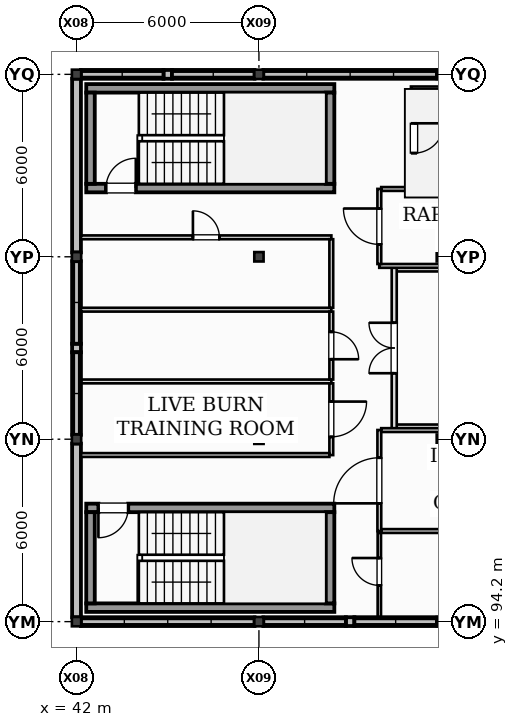
"""IFC4 building model, lengths in metres.
Left out: names, types, materials, properties, quantities, classifications, styles, units other than length and angle.
Written with IfcOpenShell. Run it as: python <this file> out.ifc"""

import sys

from ifc_helpers import new_model, si_unit, direction, frame, frame_2d, origin, origin_2d, place, context, subcontext, project, spatial, rectangle, i_section, extrude, element, fill, save


model = new_model("IFC4")
c1 = context("Model", 3, precision=1e-05, world=origin(), true_north=direction((0.0, 1.0)))
c2 = subcontext(c1, "Body", "Model", "MODEL_VIEW")
j1 = project(units=[si_unit("LENGTHUNIT", "METRE"), si_unit("PLANEANGLEUNIT", "RADIAN")], contexts=[c1])
p1 = place(None, origin())
s1 = spatial("IfcSite", under=j1, at=p1, CompositionType="ELEMENT")
p2 = place(p1, origin())
s2 = spatial("IfcBuilding", under=s1, at=p2, CompositionType="ELEMENT")
p3 = place(p2, frame((0.0, 0.0, 21.6)))
s3 = spatial("IfcBuildingStorey", under=s2, at=p3, CompositionType="ELEMENT", Elevation=21.6)
for number, where, z_axis, x_axis in (
    (1, (42.0, 94.2, 0.0), (0.0, 0.0, 1.0), (1.0, 0.0, 0.0)),
    (2, (42.0, 100.2, 0.0), (0.0, 0.0, 1.0), (1.0, 0.0, 0.0)),
    (3, (42.0, 106.2, 0.0), (0.0, 0.0, 1.0), (1.0, 0.0, 0.0)),
    (4, (42.0, 112.2, 0.0), (0.0, 0.0, 1.0), (1.0, 0.0, 0.0)),
    (5, (48.0, 94.2, 0.0), (0.0, 0.0, 1.0), (1.0, 0.0, 0.0)),
    (6, (48.0, 100.2, 0.0), (0.0, 0.0, 1.0), (1.0, 0.0, 0.0)),
    (7, (48.0, 106.2, 0.0), (0.0, 0.0, 1.0), (1.0, 0.0, 0.0)),
    (8, (48.0, 112.2, 0.0), (0.0, 0.0, 1.0), (1.0, 0.0, 0.0)),
    (9, (54.0, 94.2, 0.0), (0.0, 0.0, 1.0), (1.0, 0.0, 0.0)),
    (10, (54.0, 100.2, 0.0), (0.0, 0.0, 1.0), (1.0, 0.0, 0.0)),
    (11, (54.0, 106.2, 0.0), (0.0, 0.0, 1.0), (1.0, 0.0, 0.0)),
    (12, (54.0, 112.2, 0.0), (0.0, 0.0, 1.0), (1.0, 0.0, 0.0)),
):
    element("IfcColumn", number, at=place(p3, frame(where, z_axis=z_axis, x_axis=x_axis)), inside=s3, PredefinedType="COLUMN", context=c2, shape_type="SweptSolid", body=[
        extrude(i_section(OverallWidth=0.305, OverallDepth=0.308, WebThickness=0.01, FlangeThickness=0.015, at=origin_2d()), origin(), (0.0, 0.0, 1.0), 3.6),
    ])
p4 = place(p3, frame((42.145, 94.2, 0.0), z_axis=(0.0, 0.0, 1.0), x_axis=(1.0, 0.0, 0.0)))
e13 = element("IfcWall", 13, at=p4, inside=s3, PredefinedType="STANDARD", context=c2, shape_type="SweptSolid", body=[
    extrude(rectangle(XDim=5.71, YDim=0.29, at=frame_2d((2.855, 0.0))), origin(), (0.0, 0.0, 1.0), 0.32),
])
p5 = place(p3, frame((50.86, 94.2, 0.0), z_axis=(0.0, 0.0, 1.0), x_axis=(1.0, 0.0, 0.0)))
e14 = element("IfcWall", 14, at=p5, inside=s3, PredefinedType="STANDARD", context=c2, shape_type="SweptSolid", body=[
    extrude(rectangle(XDim=0.28, YDim=0.29, at=frame_2d((0.14, 0.0))), origin(), (0.0, 0.0, 1.0), 3.6),
])
p6 = place(p3, frame((48.145, 94.2, 0.0), z_axis=(0.0, 0.0, 1.0), x_axis=(1.0, 0.0, 0.0)))
e15 = element("IfcWall", 15, at=p6, inside=s3, PredefinedType="STANDARD", context=c2, shape_type="SweptSolid", body=[
    extrude(rectangle(XDim=2.715, YDim=0.29, at=frame_2d((1.357, 0.0))), origin(), (0.0, 0.0, 1.0), 0.44),
])
p7 = place(p3, frame((51.14, 94.2, 0.0), z_axis=(0.0, 0.0, 1.0), x_axis=(1.0, 0.0, 0.0)))
e16 = element("IfcWall", 16, at=p7, inside=s3, PredefinedType="STANDARD", context=c2, shape_type="SweptSolid", body=[
    extrude(rectangle(XDim=2.715, YDim=0.29, at=frame_2d((1.357, 0.0))), origin(), (0.0, 0.0, 1.0), 0.56),
])
p8 = place(p3, frame((45.14, 112.2, 0.0), z_axis=(0.0, 0.0, 1.0), x_axis=(-1.0, 0.0, 0.0)))
e17 = element("IfcWall", 17, at=p8, inside=s3, PredefinedType="STANDARD", context=c2, shape_type="SweptSolid", body=[
    extrude(rectangle(XDim=0.28, YDim=0.29, at=frame_2d((0.14, 0.0))), origin(), (0.0, 0.0, 1.0), 3.6),
])
p9 = place(p3, frame((47.855, 112.2, 0.0), z_axis=(0.0, 0.0, 1.0), x_axis=(-1.0, 0.0, 0.0)))
e18 = element("IfcWall", 18, at=p9, inside=s3, PredefinedType="STANDARD", context=c2, shape_type="SweptSolid", body=[
    extrude(rectangle(XDim=2.715, YDim=0.29, at=frame_2d((1.357, 0.0))), origin(), (0.0, 0.0, 1.0), 0.68),
])
p10 = place(p3, frame((44.86, 112.2, 0.0), z_axis=(0.0, 0.0, 1.0), x_axis=(-1.0, 0.0, 0.0)))
e19 = element("IfcWall", 19, at=p10, inside=s3, PredefinedType="STANDARD", context=c2, shape_type="SweptSolid", body=[
    extrude(rectangle(XDim=2.715, YDim=0.29, at=frame_2d((1.357, 0.0))), origin(), (0.0, 0.0, 1.0), 0.8),
])
p11 = place(p3, frame((53.855, 112.2, 0.0), z_axis=(0.0, 0.0, 1.0), x_axis=(-1.0, 0.0, 0.0)))
e20 = element("IfcWall", 20, at=p11, inside=s3, PredefinedType="STANDARD", context=c2, shape_type="SweptSolid", body=[
    extrude(rectangle(XDim=5.71, YDim=0.29, at=frame_2d((2.855, 0.0))), origin(), (0.0, 0.0, 1.0), 0.92),
])
p12 = place(p3, frame((42.0, 100.055, 0.0), z_axis=(0.0, 0.0, 1.0), x_axis=(0.0, -1.0, 0.0)))
e21 = element("IfcWall", 21, at=p12, inside=s3, PredefinedType="STANDARD", context=c2, shape_type="SweptSolid", body=[
    extrude(rectangle(XDim=5.71, YDim=0.29, at=frame_2d((2.855, 0.0))), origin(), (0.0, 0.0, 1.0), 2.813),
])
p13 = place(p3, frame((42.0, 103.34, 0.0), z_axis=(0.0, 0.0, 1.0), x_axis=(0.0, -1.0, 0.0)))
e22 = element("IfcWall", 22, at=p13, inside=s3, PredefinedType="STANDARD", context=c2, shape_type="SweptSolid", body=[
    extrude(rectangle(XDim=0.28, YDim=0.29, at=frame_2d((0.14, 0.0))), origin(), (0.0, 0.0, 1.0), 2.813),
])
p14 = place(p3, frame((42.0, 106.055, 0.0), z_axis=(0.0, 0.0, 1.0), x_axis=(0.0, -1.0, 0.0)))
e23 = element("IfcWall", 23, at=p14, inside=s3, PredefinedType="STANDARD", context=c2, shape_type="SweptSolid", body=[
    extrude(rectangle(XDim=2.715, YDim=0.29, at=frame_2d((1.357, 0.0))), origin(), (0.0, 0.0, 1.0), 0.32),
])
p15 = place(p3, frame((42.0, 103.06, 0.0), z_axis=(0.0, 0.0, 1.0), x_axis=(0.0, -1.0, 0.0)))
e24 = element("IfcWall", 24, at=p15, inside=s3, PredefinedType="STANDARD", context=c2, shape_type="SweptSolid", body=[
    extrude(rectangle(XDim=2.715, YDim=0.29, at=frame_2d((1.357, 0.0))), origin(), (0.0, 0.0, 1.0), 0.44),
])
p16 = place(p3, frame((42.0, 112.055, 0.0), z_axis=(0.0, 0.0, 1.0), x_axis=(0.0, -1.0, 0.0)))
e25 = element("IfcWall", 25, at=p16, inside=s3, PredefinedType="STANDARD", context=c2, shape_type="SweptSolid", body=[
    extrude(rectangle(XDim=5.71, YDim=0.29, at=frame_2d((2.855, 0.0))), origin(), (0.0, 0.0, 1.0), 3.6),
])
p17 = place(p3, frame((42.32, 94.66, 0.0), z_axis=(0.0, 0.0, 1.0), x_axis=(1.0, 0.0, 0.0)))
e26 = element("IfcWall", 26, at=p17, inside=s3, PredefinedType="SHEAR", context=c2, shape_type="SweptSolid", body=[
    extrude(rectangle(XDim=8.16, YDim=0.28, at=frame_2d((4.08, 0.0))), origin(), (0.0, 0.0, 1.0), 3.18),
])
p18 = place(p3, frame((50.48, 97.94, 0.0), z_axis=(0.0, 0.0, 1.0), x_axis=(-1.0, 0.0, 0.0)))
e27 = element("IfcWall", 27, at=p18, inside=s3, PredefinedType="SHEAR", context=c2, shape_type="SweptSolid", body=[
    extrude(rectangle(XDim=8.16, YDim=0.28, at=frame_2d((4.08, 0.0))), origin(), (0.0, 0.0, 1.0), 3.18),
])
p19 = place(p18, frame((6.78, 0.0, 0.0)))
e28 = element("IfcOpeningElement", 28, at=p19, cuts=e27, PredefinedType="OPENING", context=c2, shape_type="SweptSolid", body=[
    extrude(rectangle(XDim=0.98, YDim=2.15, at=frame_2d((0.49, 1.075))), frame((0.0, 0.15, 0.0), z_axis=(0.0, -1.0, 0.0), x_axis=(1.0, 0.0, 0.0)), (0.0, 0.0, 1.0), 0.3),
])
for number, where, z_axis, x_axis in (
    (29, (42.46, 97.8, 0.0), (0.0, 0.0, 1.0), (0.0, -1.0, 0.0)),
    (30, (50.34, 94.8, 0.0), (0.0, 0.0, 1.0), (0.0, 1.0, 0.0)),
):
    element("IfcWall", number, at=place(p3, frame(where, z_axis=z_axis, x_axis=x_axis)), inside=s3, PredefinedType="SHEAR", context=c2, shape_type="SweptSolid", body=[
        extrude(rectangle(XDim=3.0, YDim=0.28, at=frame_2d((1.5, 0.0))), origin(), (0.0, 0.0, 1.0), 3.18),
    ])
p20 = place(p3, frame((42.32, 108.46, 0.0), z_axis=(0.0, 0.0, 1.0), x_axis=(1.0, 0.0, 0.0)))
e31 = element("IfcWall", 31, at=p20, inside=s3, PredefinedType="SHEAR", context=c2, shape_type="SweptSolid", body=[
    extrude(rectangle(XDim=8.16, YDim=0.28, at=frame_2d((4.08, 0.0))), origin(), (0.0, 0.0, 1.0), 3.18),
])
p21 = place(p20, frame((0.65, 0.0, 0.0)))
e32 = element("IfcOpeningElement", 32, at=p21, cuts=e31, PredefinedType="OPENING", context=c2, shape_type="SweptSolid", body=[
    extrude(rectangle(XDim=0.98, YDim=2.15, at=frame_2d((0.49, 1.075))), frame((0.0, 0.15, 0.0), z_axis=(0.0, -1.0, 0.0), x_axis=(1.0, 0.0, 0.0)), (0.0, 0.0, 1.0), 0.3),
])
p22 = place(p3, frame((50.48, 111.74, 0.0), z_axis=(0.0, 0.0, 1.0), x_axis=(-1.0, 0.0, 0.0)))
e33 = element("IfcWall", 33, at=p22, inside=s3, PredefinedType="SHEAR", context=c2, shape_type="SweptSolid", body=[
    extrude(rectangle(XDim=8.16, YDim=0.28, at=frame_2d((4.08, 0.0))), origin(), (0.0, 0.0, 1.0), 3.18),
])
for number, where, z_axis, x_axis in (
    (34, (42.46, 111.6, 0.0), (0.0, 0.0, 1.0), (0.0, -1.0, 0.0)),
    (35, (50.34, 108.6, 0.0), (0.0, 0.0, 1.0), (0.0, 1.0, 0.0)),
):
    element("IfcWall", number, at=place(p3, frame(where, z_axis=z_axis, x_axis=x_axis)), inside=s3, PredefinedType="SHEAR", context=c2, shape_type="SweptSolid", body=[
        extrude(rectangle(XDim=3.0, YDim=0.28, at=frame_2d((1.5, 0.0))), origin(), (0.0, 0.0, 1.0), 3.18),
    ])
for number, where, z_axis, x_axis in (
    (36, (53.0, 108.5, 0.0), (0.0, 0.0, 1.0), (1.0, 0.0, 0.0)),
    (37, (59.6, 111.7, 0.0), (0.0, 0.0, 1.0), (-1.0, 0.0, 0.0)),
):
    element("IfcWall", number, at=place(p3, frame(where, z_axis=z_axis, x_axis=x_axis)), inside=s3, PredefinedType="PARTITIONING", context=c2, shape_type="SweptSolid", body=[
        extrude(rectangle(XDim=6.6, YDim=0.2, at=frame_2d((3.3, 0.0))), origin(), (0.0, 0.0, 1.0), 2.89),
    ])
p23 = place(p3, frame((53.1, 111.6, 0.0), z_axis=(0.0, 0.0, 1.0), x_axis=(0.0, -1.0, 0.0)))
e38 = element("IfcWall", 38, at=p23, inside=s3, PredefinedType="PARTITIONING", context=c2, shape_type="SweptSolid", body=[
    extrude(rectangle(XDim=3.0, YDim=0.2, at=frame_2d((1.5, 0.0))), origin(), (0.0, 0.0, 1.0), 2.89),
])
p24 = place(p23, frame((1.01, 0.0, 0.0)))
e39 = element("IfcOpeningElement", 39, at=p24, cuts=e38, PredefinedType="OPENING", context=c2, shape_type="SweptSolid", body=[
    extrude(rectangle(XDim=0.98, YDim=2.15, at=frame_2d((0.49, 1.075))), frame((0.0, 0.11, 0.0), z_axis=(0.0, -1.0, 0.0), x_axis=(1.0, 0.0, 0.0)), (0.0, 0.0, 1.0), 0.22),
])
for number, where, z_axis, x_axis in (
    (40, (52.45, 100.6, 0.0), (0.0, 0.0, 1.0), (1.0, 0.0, 0.0)),
    (41, (56.448, 105.8, 0.0), (0.0, 0.0, 1.0), (-1.0, 0.0, 0.0)),
):
    element("IfcWall", number, at=place(p3, frame(where, z_axis=z_axis, x_axis=x_axis)), inside=s3, PredefinedType="PARTITIONING", context=c2, shape_type="SweptSolid", body=[
        extrude(rectangle(XDim=3.998, YDim=0.165, at=frame_2d((1.999, 0.0))), origin(), (0.0, 0.0, 1.0), 3.18),
    ])
p25 = place(p3, frame((52.45, 100.52, 0.0), z_axis=(0.0, 0.0, 1.0), x_axis=(0.0, 1.0, 0.0)))
e42 = element("IfcWall", 42, at=p25, inside=s3, PredefinedType="PARTITIONING", context=c2, shape_type="SweptSolid", body=[
    extrude(rectangle(XDim=5.36, YDim=0.165, at=frame_2d((2.68, 0.0))), origin(), (0.0, 0.0, 1.0), 3.18),
])
p26 = place(p25, frame((1.85, 0.0, 0.0)))
e43 = element("IfcOpeningElement", 43, at=p26, cuts=e42, PredefinedType="OPENING", context=c2, shape_type="SweptSolid", body=[
    extrude(rectangle(XDim=1.66, YDim=2.2, at=frame_2d((0.83, 1.1))), frame((0.0, 0.093, 0.0), z_axis=(0.0, -1.0, 0.0), x_axis=(1.0, 0.0, 0.0)), (0.0, 0.0, 1.0), 0.185),
])
p27 = place(p3, frame((42.145, 102.1, 0.0), z_axis=(0.0, 0.0, 1.0), x_axis=(1.0, 0.0, 0.0)))
e44 = element("IfcWall", 44, at=p27, inside=s3, PredefinedType="PARTITIONING", context=c2, shape_type="SweptSolid", body=[
    extrude(rectangle(XDim=8.238, YDim=0.125, at=frame_2d((4.119, 0.0))), origin(), (0.0, 0.0, 1.0), 3.18),
])
p28 = place(p3, frame((50.38, 102.038, 0.0), z_axis=(0.0, 0.0, 1.0), x_axis=(0.0, -1.0, 0.0)))
e45 = element("IfcWall", 45, at=p28, inside=s3, PredefinedType="PARTITIONING", context=c2, shape_type="SweptSolid", body=[
    extrude(rectangle(XDim=2.36, YDim=0.125, at=frame_2d((1.18, 0.0))), origin(), (0.0, 0.0, 1.0), 3.18),
])
p29 = place(p28, frame((0.6, 0.0, 0.0)))
e46 = element("IfcOpeningElement", 46, at=p29, cuts=e45, PredefinedType="OPENING", context=c2, shape_type="SweptSolid", body=[
    extrude(rectangle(XDim=1.16, YDim=2.2, at=frame_2d((0.58, 1.1))), frame((0.0, 0.073, 0.0), z_axis=(0.0, -1.0, 0.0), x_axis=(1.0, 0.0, 0.0)), (0.0, 0.0, 1.0), 0.145),
])
p30 = place(p3, frame((50.317, 99.68, 0.0), z_axis=(0.0, 0.0, 1.0), x_axis=(-1.0, 0.0, 0.0)))
e47 = element("IfcWall", 47, at=p30, inside=s3, PredefinedType="PARTITIONING", context=c2, shape_type="SweptSolid", body=[
    extrude(rectangle(XDim=8.172, YDim=0.125, at=frame_2d((4.086, 0.0))), origin(), (0.0, 0.0, 1.0), 3.18),
])
p31 = place(p3, frame((42.145, 104.46, 0.0), z_axis=(0.0, 0.0, 1.0), x_axis=(1.0, 0.0, 0.0)))
e48 = element("IfcWall", 48, at=p31, inside=s3, PredefinedType="PARTITIONING", context=c2, shape_type="SweptSolid", body=[
    extrude(rectangle(XDim=8.238, YDim=0.125, at=frame_2d((4.119, 0.0))), origin(), (0.0, 0.0, 1.0), 3.18),
])
p32 = place(p3, frame((50.38, 104.397, 0.0), z_axis=(0.0, 0.0, 1.0), x_axis=(0.0, -1.0, 0.0)))
e49 = element("IfcWall", 49, at=p32, inside=s3, PredefinedType="PARTITIONING", context=c2, shape_type="SweptSolid", body=[
    extrude(rectangle(XDim=2.235, YDim=0.125, at=frame_2d((1.117, 0.0))), origin(), (0.0, 0.0, 1.0), 3.18),
])
p33 = place(p32, frame((0.667, 0.0, 0.0)))
e50 = element("IfcOpeningElement", 50, at=p33, cuts=e49, PredefinedType="OPENING", context=c2, shape_type="SweptSolid", body=[
    extrude(rectangle(XDim=0.9, YDim=2.1, at=frame_2d((0.45, 1.05))), frame((0.0, 0.073, 0.0), z_axis=(0.0, -1.0, 0.0), x_axis=(1.0, 0.0, 0.0)), (0.0, 0.0, 1.0), 0.145),
])
p34 = place(p3, frame((42.145, 106.84, 0.0), z_axis=(0.0, 0.0, 1.0), x_axis=(1.0, 0.0, 0.0)))
e51 = element("IfcWall", 51, at=p34, inside=s3, PredefinedType="PARTITIONING", context=c2, shape_type="SweptSolid", body=[
    extrude(rectangle(XDim=8.238, YDim=0.125, at=frame_2d((4.119, 0.0))), origin(), (0.0, 0.0, 1.0), 3.18),
])
p35 = place(p34, frame((3.684, 0.0, 0.0)))
e52 = element("IfcOpeningElement", 52, at=p35, cuts=e51, PredefinedType="OPENING", context=c2, shape_type="SweptSolid", body=[
    extrude(rectangle(XDim=0.87, YDim=2.06, at=frame_2d((0.435, 1.03))), frame((0.0, 0.073, 0.0), z_axis=(0.0, -1.0, 0.0), x_axis=(1.0, 0.0, 0.0)), (0.0, 0.0, 1.0), 0.145),
])
p36 = place(p3, frame((50.38, 106.778, 0.0), z_axis=(0.0, 0.0, 1.0), x_axis=(0.0, -1.0, 0.0)))
e53 = element("IfcWall", 53, at=p36, inside=s3, PredefinedType="PARTITIONING", context=c2, shape_type="SweptSolid", body=[
    extrude(rectangle(XDim=2.255, YDim=0.125, at=frame_2d((1.127, 0.0))), origin(), (0.0, 0.0, 1.0), 3.18),
])
p37 = place(p3, frame((59.855, 105.9, 0.0), z_axis=(0.0, 0.0, 1.0), x_axis=(-1.0, 0.0, 0.0)))
e54 = element("IfcWall", 54, at=p37, inside=s3, PredefinedType="PARTITIONING", context=c2, shape_type="SweptSolid", body=[
    extrude(rectangle(XDim=7.897, YDim=0.125, at=frame_2d((3.949, 0.0))), origin(), (0.0, 0.0, 1.0), 2.89),
])
p38 = place(p3, frame((51.96, 105.962, 0.0), z_axis=(0.0, 0.0, 1.0), x_axis=(0.0, 1.0, 0.0)))
e55 = element("IfcWall", 55, at=p38, inside=s3, PredefinedType="PARTITIONING", context=c2, shape_type="SweptSolid", body=[
    extrude(rectangle(XDim=2.47, YDim=0.125, at=frame_2d((1.235, 0.0))), origin(), (0.0, 0.0, 1.0), 3.18),
])
p39 = place(p38, frame((0.645, 0.0, 0.0)))
e56 = element("IfcOpeningElement", 56, at=p39, cuts=e55, PredefinedType="OPENING", context=c2, shape_type="SweptSolid", body=[
    extrude(rectangle(XDim=1.18, YDim=2.16, at=frame_2d((0.59, 1.08))), frame((0.0, 0.073, 0.0), z_axis=(0.0, -1.0, 0.0), x_axis=(1.0, 0.0, 0.0)), (0.0, 0.0, 1.0), 0.145),
])
p40 = place(p3, frame((52.022, 108.43, 0.0), z_axis=(0.0, 0.0, 1.0), x_axis=(1.0, 0.0, 0.0)))
e57 = element("IfcWall", 57, at=p40, inside=s3, PredefinedType="PARTITIONING", context=c2, shape_type="SweptSolid", body=[
    extrude(rectangle(XDim=0.978, YDim=0.125, at=frame_2d((0.489, 0.0))), origin(), (0.0, 0.0, 1.0), 3.18),
])
p41 = place(p3, frame((51.96, 97.177, 0.0), z_axis=(0.0, 0.0, 1.0), x_axis=(0.0, 1.0, 0.0)))
e58 = element("IfcWall", 58, at=p41, inside=s3, PredefinedType="PARTITIONING", context=c2, shape_type="SweptSolid", body=[
    extrude(rectangle(XDim=3.325, YDim=0.125, at=frame_2d((1.663, 0.0))), origin(), (0.0, 0.0, 1.0), 3.18),
])
p42 = place(p41, frame((0.913, 0.0, 0.0)))
e59 = element("IfcOpeningElement", 59, at=p42, cuts=e58, PredefinedType="OPENING", context=c2, shape_type="SweptSolid", body=[
    extrude(rectangle(XDim=1.5, YDim=2.22, at=frame_2d((0.75, 1.11))), frame((0.0, 0.073, 0.0), z_axis=(0.0, -1.0, 0.0), x_axis=(1.0, 0.0, 0.0)), (0.0, 0.0, 1.0), 0.145),
])
for number, where, z_axis, x_axis in (
    (60, (52.022, 100.5, 0.0), (0.0, 0.0, 1.0), (1.0, 0.0, 0.0)),
    (61, (59.855, 97.18, 0.0), (0.0, 0.0, 1.0), (-1.0, 0.0, 0.0)),
):
    element("IfcWall", number, at=place(p3, frame(where, z_axis=z_axis, x_axis=x_axis)), inside=s3, PredefinedType="PARTITIONING", context=c2, shape_type="SweptSolid", body=[
        extrude(rectangle(XDim=7.833, YDim=0.125, at=frame_2d((3.916, 0.0))), origin(), (0.0, 0.0, 1.0), 3.18),
    ])
p43 = place(p3, frame((51.96, 94.345, 0.0), z_axis=(0.0, 0.0, 1.0), x_axis=(0.0, 1.0, 0.0)))
e62 = element("IfcWall", 62, at=p43, inside=s3, PredefinedType="PARTITIONING", context=c2, shape_type="SweptSolid", body=[
    extrude(rectangle(XDim=2.772, YDim=0.11, at=frame_2d((1.386, 0.0))), origin(), (0.0, 0.0, 1.0), 3.18),
])
p44 = place(p43, frame((1.047, 0.0, 0.0)))
e63 = element("IfcOpeningElement", 63, at=p44, cuts=e62, PredefinedType="OPENING", context=c2, shape_type="SweptSolid", body=[
    extrude(rectangle(XDim=0.9, YDim=2.1, at=frame_2d((0.45, 1.05))), frame((0.0, 0.065, 0.0), z_axis=(0.0, -1.0, 0.0), x_axis=(1.0, 0.0, 0.0)), (0.0, 0.0, 1.0), 0.13),
])
p45 = place(p2, frame((0.0, 0.0, 25.2)))
p46 = place(p45, frame((0.0, 0.0, -0.42)))
p47 = place(p46, frame((44.5, 107.7, -0.01)))
p48 = place(p47, frame((0.0, 0.0, 0.37)))
e64 = element("IfcWindow", 64, at=p48, inside=s3, PartitioningType="SINGLE_PANEL", PredefinedType="SKYLIGHT", context=c2, shape_type="SweptSolid", body=[
    extrude(rectangle(XDim=1.55, YDim=1.55, at=origin_2d()), origin(), (0.0, 0.0, 1.0), 0.06),
])
p49 = place(p46, frame((48.0, 107.7, -0.01)))
p50 = place(p49, frame((0.0, 0.0, 0.37)))
e65 = element("IfcWindow", 65, at=p50, inside=s3, PartitioningType="SINGLE_PANEL", PredefinedType="SKYLIGHT", context=c2, shape_type="SweptSolid", body=[
    extrude(rectangle(XDim=1.75, YDim=1.35, at=origin_2d()), origin(), (0.0, 0.0, 1.0), 0.06),
])
p51 = place(p46, frame((51.5, 107.7, -0.01)))
p52 = place(p51, frame((0.0, 0.0, 0.37)))
e66 = element("IfcWindow", 66, at=p52, inside=s3, PartitioningType="SINGLE_PANEL", PredefinedType="SKYLIGHT", context=c2, shape_type="SweptSolid", body=[
    extrude(rectangle(XDim=1.95, YDim=1.48, at=origin_2d()), origin(), (0.0, 0.0, 1.0), 0.06),
])
p53 = place(p19, origin())
e67 = element("IfcDoor", 67, at=p53, inside=s3, OperationType="SINGLE_SWING_RIGHT", PredefinedType="DOOR", context=c2, shape_type="SweptSolid", body=[
    extrude(rectangle(XDim=0.98, YDim=2.15, at=frame_2d((0.49, 1.075))), frame((0.0, 0.025, 0.0), z_axis=(0.0, -1.0, 0.0), x_axis=(1.0, 0.0, 0.0)), (0.0, 0.0, 1.0), 0.05),
])
fill(e28, e67)
p54 = place(p21, origin())
e68 = element("IfcDoor", 68, at=p54, inside=s3, OperationType="SINGLE_SWING_RIGHT", PredefinedType="DOOR", context=c2, shape_type="SweptSolid", body=[
    extrude(rectangle(XDim=0.98, YDim=2.15, at=frame_2d((0.49, 1.075))), frame((0.0, 0.025, 0.0), z_axis=(0.0, -1.0, 0.0), x_axis=(1.0, 0.0, 0.0)), (0.0, 0.0, 1.0), 0.05),
])
fill(e32, e68)
p55 = place(p24, origin())
e69 = element("IfcDoor", 69, at=p55, inside=s3, OperationType="SINGLE_SWING_LEFT", PredefinedType="DOOR", context=c2, shape_type="SweptSolid", body=[
    extrude(rectangle(XDim=0.98, YDim=2.15, at=frame_2d((0.49, 1.075))), frame((0.0, 0.025, 0.0), z_axis=(0.0, -1.0, 0.0), x_axis=(1.0, 0.0, 0.0)), (0.0, 0.0, 1.0), 0.05),
])
fill(e39, e69)
p56 = place(p26, frame((1.66, 0.0, 0.0), z_axis=(0.0, 0.0, 1.0), x_axis=(-1.0, 0.0, 0.0)))
e70 = element("IfcDoor", 70, at=p56, inside=s3, OperationType="DOUBLE_DOOR_SINGLE_SWING", PredefinedType="DOOR", context=c2, shape_type="SweptSolid", body=[
    extrude(rectangle(XDim=1.66, YDim=2.2, at=frame_2d((0.83, 1.1))), frame((0.0, 0.025, 0.0), z_axis=(0.0, -1.0, 0.0), x_axis=(1.0, 0.0, 0.0)), (0.0, 0.0, 1.0), 0.05),
])
fill(e43, e70)
p57 = place(p29, frame((1.16, 0.0, 0.0), z_axis=(0.0, 0.0, 1.0), x_axis=(-1.0, 0.0, 0.0)))
e71 = element("IfcDoor", 71, at=p57, inside=s3, OperationType="SINGLE_SWING_LEFT", PredefinedType="DOOR", context=c2, shape_type="SweptSolid", body=[
    extrude(rectangle(XDim=1.16, YDim=2.2, at=frame_2d((0.58, 1.1))), frame((0.0, 0.025, 0.0), z_axis=(0.0, -1.0, 0.0), x_axis=(1.0, 0.0, 0.0)), (0.0, 0.0, 1.0), 0.05),
])
fill(e46, e71)
p58 = place(p33, frame((0.9, 0.0, 0.0), z_axis=(0.0, 0.0, 1.0), x_axis=(-1.0, 0.0, 0.0)))
e72 = element("IfcDoor", 72, at=p58, inside=s3, OperationType="SINGLE_SWING_RIGHT", PredefinedType="DOOR", context=c2, shape_type="SweptSolid", body=[
    extrude(rectangle(XDim=0.9, YDim=2.1, at=frame_2d((0.45, 1.05))), frame((0.0, 0.025, 0.0), z_axis=(0.0, -1.0, 0.0), x_axis=(1.0, 0.0, 0.0)), (0.0, 0.0, 1.0), 0.05),
])
fill(e50, e72)
p59 = place(p35, frame((0.87, 0.0, 0.0), z_axis=(0.0, 0.0, 1.0), x_axis=(-1.0, 0.0, 0.0)))
e73 = element("IfcDoor", 73, at=p59, inside=s3, OperationType="SINGLE_SWING_LEFT", PredefinedType="DOOR", context=c2, shape_type="SweptSolid", body=[
    extrude(rectangle(XDim=0.87, YDim=2.06, at=frame_2d((0.435, 1.03))), frame((0.0, 0.025, 0.0), z_axis=(0.0, -1.0, 0.0), x_axis=(1.0, 0.0, 0.0)), (0.0, 0.0, 1.0), 0.05),
])
fill(e52, e73)
p60 = place(p39, frame((1.18, 0.0, 0.0), z_axis=(0.0, 0.0, 1.0), x_axis=(-1.0, 0.0, 0.0)))
e74 = element("IfcDoor", 74, at=p60, inside=s3, OperationType="SINGLE_SWING_RIGHT", PredefinedType="DOOR", context=c2, shape_type="SweptSolid", body=[
    extrude(rectangle(XDim=1.18, YDim=2.16, at=frame_2d((0.59, 1.08))), frame((0.0, 0.025, 0.0), z_axis=(0.0, -1.0, 0.0), x_axis=(1.0, 0.0, 0.0)), (0.0, 0.0, 1.0), 0.05),
])
fill(e56, e74)
p61 = place(p42, frame((1.5, 0.0, 0.0), z_axis=(0.0, 0.0, 1.0), x_axis=(-1.0, 0.0, 0.0)))
e75 = element("IfcDoor", 75, at=p61, inside=s3, OperationType="SINGLE_SWING_LEFT", PredefinedType="DOOR", context=c2, shape_type="SweptSolid", body=[
    extrude(rectangle(XDim=1.5, YDim=2.22, at=frame_2d((0.75, 1.11))), frame((0.0, 0.025, 0.0), z_axis=(0.0, -1.0, 0.0), x_axis=(1.0, 0.0, 0.0)), (0.0, 0.0, 1.0), 0.05),
])
fill(e59, e75)
p62 = place(p44, frame((0.9, 0.0, 0.0), z_axis=(0.0, 0.0, 1.0), x_axis=(-1.0, 0.0, 0.0)))
e76 = element("IfcDoor", 76, at=p62, inside=s3, OperationType="SINGLE_SWING_RIGHT", PredefinedType="DOOR", context=c2, shape_type="SweptSolid", body=[
    extrude(rectangle(XDim=0.9, YDim=2.1, at=frame_2d((0.45, 1.05))), frame((0.0, 0.025, 0.0), z_axis=(0.0, -1.0, 0.0), x_axis=(1.0, 0.0, 0.0)), (0.0, 0.0, 1.0), 0.05),
])
fill(e63, e76)
save(model, sys.argv[1])
